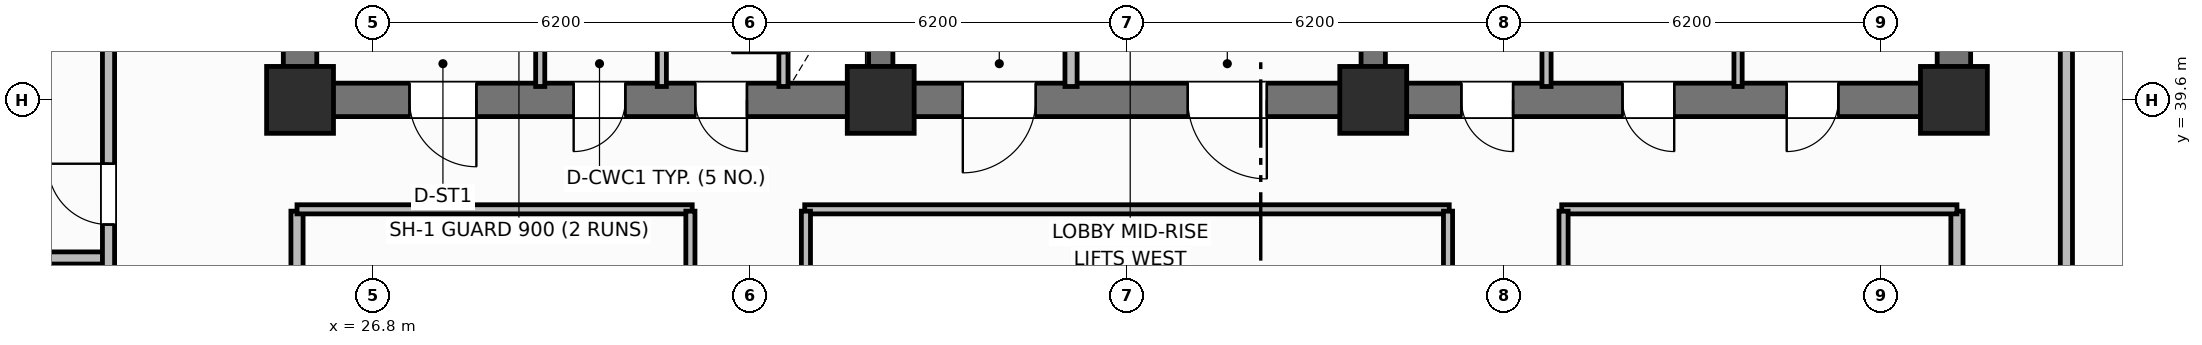
"""IFC4 building model, lengths in metres.
Left out: names, types, materials, properties, quantities, classifications, styles, units other than length and angle.
Written with IfcOpenShell. Run it as: python <this file> out.ifc"""

import sys

from ifc_helpers import new_model, si_unit, direction, frame, frame_2d, origin, origin_2d, place, context, subcontext, project, spatial, rectangle, extrude, element, fill, save


model = new_model("IFC4")
c1 = context("Model", 3, precision=1e-05, world=origin(), true_north=direction((0.0, 1.0)))
c2 = subcontext(c1, "Body", "Model", "MODEL_VIEW")
j1 = project(units=[si_unit("LENGTHUNIT", "METRE"), si_unit("PLANEANGLEUNIT", "RADIAN")], contexts=[c1])
p1 = place(None, origin())
s1 = spatial("IfcSite", under=j1, at=p1, CompositionType="ELEMENT")
p2 = place(p1, origin())
s2 = spatial("IfcBuilding", under=s1, at=p2, CompositionType="ELEMENT")
p3 = place(p2, frame((0.0, 0.0, 103.1)))
s3 = spatial("IfcBuildingStorey", under=s2, at=p3, CompositionType="ELEMENT", Elevation=103.1)
for number, where, z_axis, x_axis in (
    (1, (25.6, 39.875, 0.0), (0.0, 0.0, 1.0), (0.0, 1.0, 0.0)),
    (2, (52.8, 39.875, 0.0), (0.0, 0.0, 1.0), (0.0, 1.0, 0.0)),
):
    element("IfcWall", number, at=place(p3, frame(where, z_axis=z_axis, x_axis=x_axis)), inside=s3, PredefinedType="SHEAR", context=c2, shape_type="SweptSolid", body=[
        extrude(rectangle(XDim=5.65, YDim=0.55, at=frame_2d((2.825, 0.0))), origin(), (0.0, 0.0, 1.0), 3.7),
    ])
p4 = place(p3, frame((52.8, 39.6, 0.0), z_axis=(0.0, 0.0, 1.0), x_axis=(-1.0, 0.0, 0.0)))
e3 = element("IfcWall", 3, at=p4, inside=s3, PredefinedType="SHEAR", context=c2, shape_type="SweptSolid", body=[
    extrude(rectangle(XDim=27.2, YDim=0.55, at=frame_2d((13.6, 0.0))), origin(), (0.0, 0.0, 1.0), 3.7),
])
p5 = place(p4, frame((24.3, 0.0, 0.0)))
e4 = element("IfcOpeningElement", 4, at=p5, cuts=e3, PredefinedType="OPENING", context=c2, shape_type="SweptSolid", body=[
    extrude(rectangle(XDim=1.1, YDim=2.15, at=frame_2d((0.55, 1.075))), frame((0.0, 0.285, 0.0), z_axis=(0.0, -1.0, 0.0), x_axis=(1.0, 0.0, 0.0)), (0.0, 0.0, 1.0), 0.57),
])
p6 = place(p4, frame((21.85, 0.0, 0.0)))
e5 = element("IfcOpeningElement", 5, at=p6, cuts=e3, PredefinedType="OPENING", context=c2, shape_type="SweptSolid", body=[
    extrude(rectangle(XDim=0.85, YDim=2.1, at=frame_2d((0.425, 1.05))), frame((0.0, 0.285, 0.0), z_axis=(0.0, -1.0, 0.0), x_axis=(1.0, 0.0, 0.0)), (0.0, 0.0, 1.0), 0.57),
])
p7 = place(p4, frame((19.85, 0.0, 0.0)))
e6 = element("IfcOpeningElement", 6, at=p7, cuts=e3, PredefinedType="OPENING", context=c2, shape_type="SweptSolid", body=[
    extrude(rectangle(XDim=0.85, YDim=2.1, at=frame_2d((0.425, 1.05))), frame((0.0, 0.285, 0.0), z_axis=(0.0, -1.0, 0.0), x_axis=(1.0, 0.0, 0.0)), (0.0, 0.0, 1.0), 0.57),
])
p8 = place(p4, frame((15.1, 0.0, 0.0)))
e7 = element("IfcOpeningElement", 7, at=p8, cuts=e3, PredefinedType="OPENING", context=c2, shape_type="SweptSolid", body=[
    extrude(rectangle(XDim=1.2, YDim=2.15, at=frame_2d((0.6, 1.075))), frame((0.0, 0.285, 0.0), z_axis=(0.0, -1.0, 0.0), x_axis=(1.0, 0.0, 0.0)), (0.0, 0.0, 1.0), 0.57),
])
p9 = place(p4, frame((11.3, 0.0, 0.0)))
e8 = element("IfcOpeningElement", 8, at=p9, cuts=e3, PredefinedType="OPENING", context=c2, shape_type="SweptSolid", body=[
    extrude(rectangle(XDim=1.3, YDim=2.2, at=frame_2d((0.65, 1.1))), frame((0.0, 0.285, 0.0), z_axis=(0.0, -1.0, 0.0), x_axis=(1.0, 0.0, 0.0)), (0.0, 0.0, 1.0), 0.57),
])
p10 = place(p4, frame((7.25, 0.0, 0.0)))
e9 = element("IfcOpeningElement", 9, at=p10, cuts=e3, PredefinedType="OPENING", context=c2, shape_type="SweptSolid", body=[
    extrude(rectangle(XDim=0.85, YDim=2.1, at=frame_2d((0.425, 1.05))), frame((0.0, 0.285, 0.0), z_axis=(0.0, -1.0, 0.0), x_axis=(1.0, 0.0, 0.0)), (0.0, 0.0, 1.0), 0.57),
])
p11 = place(p4, frame((4.6, 0.0, 0.0)))
e10 = element("IfcOpeningElement", 10, at=p11, cuts=e3, PredefinedType="OPENING", context=c2, shape_type="SweptSolid", body=[
    extrude(rectangle(XDim=0.85, YDim=2.1, at=frame_2d((0.425, 1.05))), frame((0.0, 0.285, 0.0), z_axis=(0.0, -1.0, 0.0), x_axis=(1.0, 0.0, 0.0)), (0.0, 0.0, 1.0), 0.57),
])
p12 = place(p4, frame((1.9, 0.0, 0.0)))
e11 = element("IfcOpeningElement", 11, at=p12, cuts=e3, PredefinedType="OPENING", context=c2, shape_type="SweptSolid", body=[
    extrude(rectangle(XDim=0.85, YDim=2.1, at=frame_2d((0.425, 1.05))), frame((0.0, 0.285, 0.0), z_axis=(0.0, -1.0, 0.0), x_axis=(1.0, 0.0, 0.0)), (0.0, 0.0, 1.0), 0.57),
])
for number, where, z_axis, x_axis in (
    (12, (35.15, 39.875, 0.0), (0.0, 0.0, 1.0), (0.0, 1.0, 0.0)),
    (13, (43.25, 39.875, 0.0), (0.0, 0.0, 1.0), (0.0, 1.0, 0.0)),
):
    element("IfcWall", number, at=place(p3, frame(where, z_axis=z_axis, x_axis=x_axis)), inside=s3, PredefinedType="SHEAR", context=c2, shape_type="SweptSolid", body=[
        extrude(rectangle(XDim=5.65, YDim=0.4, at=frame_2d((2.825, 0.0))), origin(), (0.0, 0.0, 1.0), 3.7),
    ])
for number, where, z_axis, x_axis in (
    (14, (25.6, 39.6, 0.0), (0.0, 0.0, 1.0), (1.0, 0.0, 0.0)),
    (15, (35.15, 39.6, 0.0), (0.0, 0.0, 1.0), (1.0, 0.0, 0.0)),
    (16, (43.25, 39.6, 0.0), (0.0, 0.0, 1.0), (1.0, 0.0, 0.0)),
    (17, (52.8, 39.6, 0.0), (0.0, 0.0, 1.0), (1.0, 0.0, 0.0)),
):
    element("IfcColumn", number, at=place(p3, frame(where, z_axis=z_axis, x_axis=x_axis)), inside=s3, PredefinedType="COLUMN", context=c2, shape_type="SweptSolid", body=[
        extrude(rectangle(XDim=1.1, YDim=1.1, at=origin_2d()), origin(), (0.0, 0.0, 1.0), 3.7),
    ])
p13 = place(p3, frame((33.55, 39.82, 0.0), z_axis=(0.0, 0.0, 1.0), x_axis=(0.0, 1.0, 0.0)))
e18 = element("IfcWall", 18, at=p13, inside=s3, PredefinedType="PARTITIONING", context=c2, shape_type="SweptSolid", body=[
    extrude(rectangle(XDim=2.13, YDim=0.15, at=frame_2d((1.065, 0.0))), origin(), (0.0, 0.0, 1.0), 2.53),
])
p14 = place(p13, frame((0.55, 0.0, 0.0)))
e19 = element("IfcOpeningElement", 19, at=p14, cuts=e18, PredefinedType="OPENING", context=c2, shape_type="SweptSolid", body=[
    extrude(rectangle(XDim=0.85, YDim=2.05, at=frame_2d((0.425, 1.025))), frame((0.0, 0.085, 0.0), z_axis=(0.0, -1.0, 0.0), x_axis=(1.0, 0.0, 0.0)), (0.0, 0.0, 1.0), 0.17),
])
for number, where, z_axis, x_axis in (
    (20, (29.55, 39.82, 0.0), (0.0, 0.0, 1.0), (0.0, 1.0, 0.0)),
    (21, (31.55, 39.82, 0.0), (0.0, 0.0, 1.0), (0.0, 1.0, 0.0)),
):
    element("IfcWall", number, at=place(p3, frame(where, z_axis=z_axis, x_axis=x_axis)), inside=s3, PredefinedType="PARTITIONING", context=c2, shape_type="SweptSolid", body=[
        extrude(rectangle(XDim=2.13, YDim=0.15, at=frame_2d((1.065, 0.0))), origin(), (0.0, 0.0, 1.0), 2.53),
    ])
p15 = place(p3, frame((38.28, 39.82, 0.0), z_axis=(0.0, 0.0, 1.0), x_axis=(0.0, 1.0, 0.0)))
e22 = element("IfcWall", 22, at=p15, inside=s3, PredefinedType="PARTITIONING", context=c2, shape_type="SweptSolid", body=[
    extrude(rectangle(XDim=2.73, YDim=0.2, at=frame_2d((1.365, 0.0))), origin(), (0.0, 0.0, 1.0), 2.53),
])
p16 = place(p3, frame((46.1, 39.82, 0.0), z_axis=(0.0, 0.0, 1.0), x_axis=(0.0, 1.0, 0.0)))
e23 = element("IfcWall", 23, at=p16, inside=s3, PredefinedType="PARTITIONING", context=c2, shape_type="SweptSolid", body=[
    extrude(rectangle(XDim=2.73, YDim=0.15, at=frame_2d((1.365, 0.0))), origin(), (0.0, 0.0, 1.0), 2.53),
])
p17 = place(p3, frame((49.25, 39.82, 0.0), z_axis=(0.0, 0.0, 1.0), x_axis=(0.0, 1.0, 0.0)))
e24 = element("IfcWall", 24, at=p17, inside=s3, PredefinedType="PARTITIONING", context=c2, shape_type="SweptSolid", body=[
    extrude(rectangle(XDim=2.73, YDim=0.135, at=frame_2d((1.365, 0.0))), origin(), (0.0, 0.0, 1.0), 2.53),
])
for number, where, z_axis, x_axis in (
    (25, (25.55, 18.63, 0.0), (0.0, 0.0, 1.0), (0.0, 1.0, 0.0)),
    (26, (52.85, 18.63, 0.0), (0.0, 0.0, 1.0), (0.0, 1.0, 0.0)),
):
    element("IfcWall", number, at=place(p3, frame(where, z_axis=z_axis, x_axis=x_axis)), inside=s3, PredefinedType="PARTITIONING", context=c2, shape_type="SweptSolid", body=[
        extrude(rectangle(XDim=19.14, YDim=0.2, at=frame_2d((9.57, 0.0))), origin(), (0.0, 0.0, 1.0), 2.53),
    ])
p18 = place(p3, frame((25.55, 37.8, 0.0), z_axis=(0.0, 0.0, 1.0), x_axis=(1.0, 0.0, 0.0)))
e27 = element("IfcWall", 27, at=p18, inside=s3, PredefinedType="PARTITIONING", context=c2, shape_type="SweptSolid", body=[
    extrude(rectangle(XDim=6.5, YDim=0.15, at=frame_2d((3.25, 0.0))), origin(), (0.0, 0.0, 1.0), 2.53),
])
p19 = place(p3, frame((33.9, 37.8, 0.0), z_axis=(0.0, 0.0, 1.0), x_axis=(1.0, 0.0, 0.0)))
e28 = element("IfcWall", 28, at=p19, inside=s3, PredefinedType="PARTITIONING", context=c2, shape_type="SweptSolid", body=[
    extrude(rectangle(XDim=10.6, YDim=0.15, at=frame_2d((5.3, 0.0))), origin(), (0.0, 0.0, 1.0), 2.53),
])
p20 = place(p3, frame((46.35, 37.8, 0.0), z_axis=(0.0, 0.0, 1.0), x_axis=(1.0, 0.0, 0.0)))
e29 = element("IfcWall", 29, at=p20, inside=s3, PredefinedType="PARTITIONING", context=c2, shape_type="SweptSolid", body=[
    extrude(rectangle(XDim=6.5, YDim=0.15, at=frame_2d((3.25, 0.0))), origin(), (0.0, 0.0, 1.0), 2.53),
])
p21 = place(p3, frame((32.02, 18.63, 0.0), z_axis=(0.0, 0.0, 1.0), x_axis=(0.0, 1.0, 0.0)))
e30 = element("IfcWall", 30, at=p21, inside=s3, PredefinedType="PARTITIONING", context=c2, shape_type="SweptSolid", body=[
    extrude(rectangle(XDim=19.14, YDim=0.15, at=frame_2d((9.57, 0.0))), origin(), (0.0, 0.0, 1.0), 2.53),
])
p22 = place(p21, frame((3.0, 0.0, 0.0)))
e31 = element("IfcOpeningElement", 31, at=p22, cuts=e30, PredefinedType="OPENING", context=c2, shape_type="SweptSolid", body=[
    extrude(rectangle(XDim=0.9, YDim=2.1, at=frame_2d((0.45, 1.05))), frame((0.0, 0.085, 0.0), z_axis=(0.0, -1.0, 0.0), x_axis=(1.0, 0.0, 0.0)), (0.0, 0.0, 1.0), 0.17),
])
p23 = place(p21, frame((11.5, 0.0, 0.0)))
e32 = element("IfcOpeningElement", 32, at=p23, cuts=e30, PredefinedType="OPENING", context=c2, shape_type="SweptSolid", body=[
    extrude(rectangle(XDim=0.9, YDim=2.1, at=frame_2d((0.45, 1.05))), frame((0.0, 0.085, 0.0), z_axis=(0.0, -1.0, 0.0), x_axis=(1.0, 0.0, 0.0)), (0.0, 0.0, 1.0), 0.17),
])
p24 = place(p3, frame((33.92, 18.63, 0.0), z_axis=(0.0, 0.0, 1.0), x_axis=(0.0, 1.0, 0.0)))
e33 = element("IfcWall", 33, at=p24, inside=s3, PredefinedType="PARTITIONING", context=c2, shape_type="SweptSolid", body=[
    extrude(rectangle(XDim=19.14, YDim=0.15, at=frame_2d((9.57, 0.0))), origin(), (0.0, 0.0, 1.0), 2.53),
])
p25 = place(p24, frame((2.4, 0.0, 0.0)))
e34 = element("IfcOpeningElement", 34, at=p25, cuts=e33, PredefinedType="OPENING", context=c2, shape_type="SweptSolid", body=[
    extrude(rectangle(XDim=0.9, YDim=2.1, at=frame_2d((0.45, 1.05))), frame((0.0, 0.085, 0.0), z_axis=(0.0, -1.0, 0.0), x_axis=(1.0, 0.0, 0.0)), (0.0, 0.0, 1.0), 0.17),
])
p26 = place(p3, frame((44.48, 18.63, 0.0), z_axis=(0.0, 0.0, 1.0), x_axis=(0.0, 1.0, 0.0)))
e35 = element("IfcWall", 35, at=p26, inside=s3, PredefinedType="PARTITIONING", context=c2, shape_type="SweptSolid", body=[
    extrude(rectangle(XDim=19.14, YDim=0.15, at=frame_2d((9.57, 0.0))), origin(), (0.0, 0.0, 1.0), 2.53),
])
p27 = place(p26, frame((9.847, 0.0, 0.0)))
e36 = element("IfcOpeningElement", 36, at=p27, cuts=e35, PredefinedType="OPENING", context=c2, shape_type="SweptSolid", body=[
    extrude(rectangle(XDim=0.9, YDim=2.1, at=frame_2d((0.45, 1.05))), frame((0.0, 0.085, 0.0), z_axis=(0.0, -1.0, 0.0), x_axis=(1.0, 0.0, 0.0)), (0.0, 0.0, 1.0), 0.17),
])
p28 = place(p3, frame((46.38, 18.63, 0.0), z_axis=(0.0, 0.0, 1.0), x_axis=(0.0, 1.0, 0.0)))
e37 = element("IfcWall", 37, at=p28, inside=s3, PredefinedType="PARTITIONING", context=c2, shape_type="SweptSolid", body=[
    extrude(rectangle(XDim=19.14, YDim=0.15, at=frame_2d((9.57, 0.0))), origin(), (0.0, 0.0, 1.0), 2.53),
])
p29 = place(p28, frame((5.5, 0.0, 0.0)))
e38 = element("IfcOpeningElement", 38, at=p29, cuts=e37, PredefinedType="OPENING", context=c2, shape_type="SweptSolid", body=[
    extrude(rectangle(XDim=1.0, YDim=2.15, at=frame_2d((0.5, 1.075))), frame((0.0, 0.085, 0.0), z_axis=(0.0, -1.0, 0.0), x_axis=(1.0, 0.0, 0.0)), (0.0, 0.0, 1.0), 0.17),
])
p30 = place(p3, frame((14.57, 37.0, 0.0), z_axis=(0.0, 0.0, 1.0), x_axis=(1.0, 0.0, 0.0)))
e39 = element("IfcWall", 39, at=p30, inside=s3, PredefinedType="PARTITIONING", context=c2, shape_type="SweptSolid", body=[
    extrude(rectangle(XDim=7.88, YDim=0.2, at=frame_2d((3.94, 0.0))), origin(), (0.0, 0.0, 1.0), 2.53),
])
p31 = place(p3, frame((22.45, 10.6, 0.0), z_axis=(0.0, 0.0, 1.0), x_axis=(0.0, 1.0, 0.0)))
e40 = element("IfcWall", 40, at=p31, inside=s3, PredefinedType="PARTITIONING", context=c2, shape_type="SweptSolid", body=[
    extrude(rectangle(XDim=35.2, YDim=0.2, at=frame_2d((17.6, 0.0))), origin(), (0.0, 0.0, 1.0), 2.53),
])
p32 = place(p31, frame((2.65, 0.0, 0.0)))
e41 = element("IfcOpeningElement", 41, at=p32, cuts=e40, PredefinedType="OPENING", context=c2, shape_type="SweptSolid", body=[
    extrude(rectangle(XDim=1.0, YDim=2.15, at=frame_2d((0.5, 1.075))), frame((0.0, 0.11, 0.0), z_axis=(0.0, -1.0, 0.0), x_axis=(1.0, 0.0, 0.0)), (0.0, 0.0, 1.0), 0.22),
])
p33 = place(p31, frame((10.81, 0.0, 0.0)))
e42 = element("IfcOpeningElement", 42, at=p33, cuts=e40, PredefinedType="OPENING", context=c2, shape_type="SweptSolid", body=[
    extrude(rectangle(XDim=1.0, YDim=2.15, at=frame_2d((0.5, 1.075))), frame((0.0, 0.11, 0.0), z_axis=(0.0, -1.0, 0.0), x_axis=(1.0, 0.0, 0.0)), (0.0, 0.0, 1.0), 0.22),
])
p34 = place(p31, frame((19.54, 0.0, 0.0)))
e43 = element("IfcOpeningElement", 43, at=p34, cuts=e40, PredefinedType="OPENING", context=c2, shape_type="SweptSolid", body=[
    extrude(rectangle(XDim=1.0, YDim=2.15, at=frame_2d((0.5, 1.075))), frame((0.0, 0.11, 0.0), z_axis=(0.0, -1.0, 0.0), x_axis=(1.0, 0.0, 0.0)), (0.0, 0.0, 1.0), 0.22),
])
p35 = place(p31, frame((26.95, 0.0, 0.0)))
e44 = element("IfcOpeningElement", 44, at=p35, cuts=e40, PredefinedType="OPENING", context=c2, shape_type="SweptSolid", body=[
    extrude(rectangle(XDim=1.0, YDim=2.15, at=frame_2d((0.5, 1.075))), frame((0.0, 0.11, 0.0), z_axis=(0.0, -1.0, 0.0), x_axis=(1.0, 0.0, 0.0)), (0.0, 0.0, 1.0), 0.22),
])
p36 = place(p3, frame((54.65, 10.6, 0.0), z_axis=(0.0, 0.0, 1.0), x_axis=(0.0, 1.0, 0.0)))
e45 = element("IfcWall", 45, at=p36, inside=s3, PredefinedType="PARTITIONING", context=c2, shape_type="SweptSolid", body=[
    extrude(rectangle(XDim=35.2, YDim=0.2, at=frame_2d((17.6, 0.0))), origin(), (0.0, 0.0, 1.0), 2.53),
])
p37 = place(p36, frame((2.65, 0.0, 0.0)))
e46 = element("IfcOpeningElement", 46, at=p37, cuts=e45, PredefinedType="OPENING", context=c2, shape_type="SweptSolid", body=[
    extrude(rectangle(XDim=1.0, YDim=2.15, at=frame_2d((0.5, 1.075))), frame((0.0, 0.11, 0.0), z_axis=(0.0, -1.0, 0.0), x_axis=(1.0, 0.0, 0.0)), (0.0, 0.0, 1.0), 0.22),
])
p38 = place(p36, frame((19.95, 0.0, 0.0)))
e47 = element("IfcOpeningElement", 47, at=p38, cuts=e45, PredefinedType="OPENING", context=c2, shape_type="SweptSolid", body=[
    extrude(rectangle(XDim=1.0, YDim=2.15, at=frame_2d((0.5, 1.075))), frame((0.0, 0.11, 0.0), z_axis=(0.0, -1.0, 0.0), x_axis=(1.0, 0.0, 0.0)), (0.0, 0.0, 1.0), 0.22),
])
p39 = place(p14, origin())
e48 = element("IfcDoor", 48, at=p39, inside=s3, OperationType="SINGLE_SWING_LEFT", PredefinedType="TRAPDOOR", context=c2, shape_type="SweptSolid", body=[
    extrude(rectangle(XDim=0.85, YDim=2.05, at=frame_2d((0.425, 1.025))), frame((0.0, 0.025, 0.0), z_axis=(0.0, -1.0, 0.0), x_axis=(1.0, 0.0, 0.0)), (0.0, 0.0, 1.0), 0.05),
])
fill(e19, e48)
p40 = place(p35, origin())
e49 = element("IfcDoor", 49, at=p40, inside=s3, OperationType="SINGLE_SWING_RIGHT", PredefinedType="DOOR", context=c2, shape_type="SweptSolid", body=[
    extrude(rectangle(XDim=1.0, YDim=2.15, at=frame_2d((0.5, 1.075))), frame((0.0, 0.025, 0.0), z_axis=(0.0, -1.0, 0.0), x_axis=(1.0, 0.0, 0.0)), (0.0, 0.0, 1.0), 0.05),
])
fill(e44, e49)
p41 = place(p5, origin())
e50 = element("IfcDoor", 50, at=p41, inside=s3, OperationType="SINGLE_SWING_LEFT", PredefinedType="DOOR", context=c2, shape_type="SweptSolid", body=[
    extrude(rectangle(XDim=1.1, YDim=2.15, at=frame_2d((0.55, 1.075))), frame((0.0, 0.025, 0.0), z_axis=(0.0, -1.0, 0.0), x_axis=(1.0, 0.0, 0.0)), (0.0, 0.0, 1.0), 0.05),
])
fill(e4, e50)
p42 = place(p6, origin())
e51 = element("IfcDoor", 51, at=p42, inside=s3, OperationType="SINGLE_SWING_RIGHT", PredefinedType="DOOR", context=c2, shape_type="SweptSolid", body=[
    extrude(rectangle(XDim=0.85, YDim=2.1, at=frame_2d((0.425, 1.05))), frame((0.0, 0.025, 0.0), z_axis=(0.0, -1.0, 0.0), x_axis=(1.0, 0.0, 0.0)), (0.0, 0.0, 1.0), 0.05),
])
fill(e5, e51)
p43 = place(p7, origin())
e52 = element("IfcDoor", 52, at=p43, inside=s3, OperationType="SINGLE_SWING_LEFT", PredefinedType="DOOR", context=c2, shape_type="SweptSolid", body=[
    extrude(rectangle(XDim=0.85, YDim=2.1, at=frame_2d((0.425, 1.05))), frame((0.0, 0.025, 0.0), z_axis=(0.0, -1.0, 0.0), x_axis=(1.0, 0.0, 0.0)), (0.0, 0.0, 1.0), 0.05),
])
fill(e6, e52)
p44 = place(p8, origin())
e53 = element("IfcDoor", 53, at=p44, inside=s3, OperationType="SINGLE_SWING_RIGHT", PredefinedType="DOOR", context=c2, shape_type="SweptSolid", body=[
    extrude(rectangle(XDim=1.2, YDim=2.15, at=frame_2d((0.6, 1.075))), frame((0.0, 0.025, 0.0), z_axis=(0.0, -1.0, 0.0), x_axis=(1.0, 0.0, 0.0)), (0.0, 0.0, 1.0), 0.05),
])
fill(e7, e53)
p45 = place(p9, origin())
e54 = element("IfcDoor", 54, at=p45, inside=s3, OperationType="SINGLE_SWING_LEFT", PredefinedType="DOOR", context=c2, shape_type="SweptSolid", body=[
    extrude(rectangle(XDim=1.3, YDim=2.2, at=frame_2d((0.65, 1.1))), frame((0.0, 0.025, 0.0), z_axis=(0.0, -1.0, 0.0), x_axis=(1.0, 0.0, 0.0)), (0.0, 0.0, 1.0), 0.05),
])
fill(e8, e54)
p46 = place(p10, origin())
e55 = element("IfcDoor", 55, at=p46, inside=s3, OperationType="SINGLE_SWING_LEFT", PredefinedType="DOOR", context=c2, shape_type="SweptSolid", body=[
    extrude(rectangle(XDim=0.85, YDim=2.1, at=frame_2d((0.425, 1.05))), frame((0.0, 0.025, 0.0), z_axis=(0.0, -1.0, 0.0), x_axis=(1.0, 0.0, 0.0)), (0.0, 0.0, 1.0), 0.05),
])
fill(e9, e55)
p47 = place(p11, origin())
e56 = element("IfcDoor", 56, at=p47, inside=s3, OperationType="SINGLE_SWING_LEFT", PredefinedType="DOOR", context=c2, shape_type="SweptSolid", body=[
    extrude(rectangle(XDim=0.85, YDim=2.1, at=frame_2d((0.425, 1.05))), frame((0.0, 0.025, 0.0), z_axis=(0.0, -1.0, 0.0), x_axis=(1.0, 0.0, 0.0)), (0.0, 0.0, 1.0), 0.05),
])
fill(e10, e56)
p48 = place(p12, origin())
e57 = element("IfcDoor", 57, at=p48, inside=s3, OperationType="SINGLE_SWING_RIGHT", PredefinedType="DOOR", context=c2, shape_type="SweptSolid", body=[
    extrude(rectangle(XDim=0.85, YDim=2.1, at=frame_2d((0.425, 1.05))), frame((0.0, 0.025, 0.0), z_axis=(0.0, -1.0, 0.0), x_axis=(1.0, 0.0, 0.0)), (0.0, 0.0, 1.0), 0.05),
])
fill(e11, e57)
save(model, sys.argv[1])
